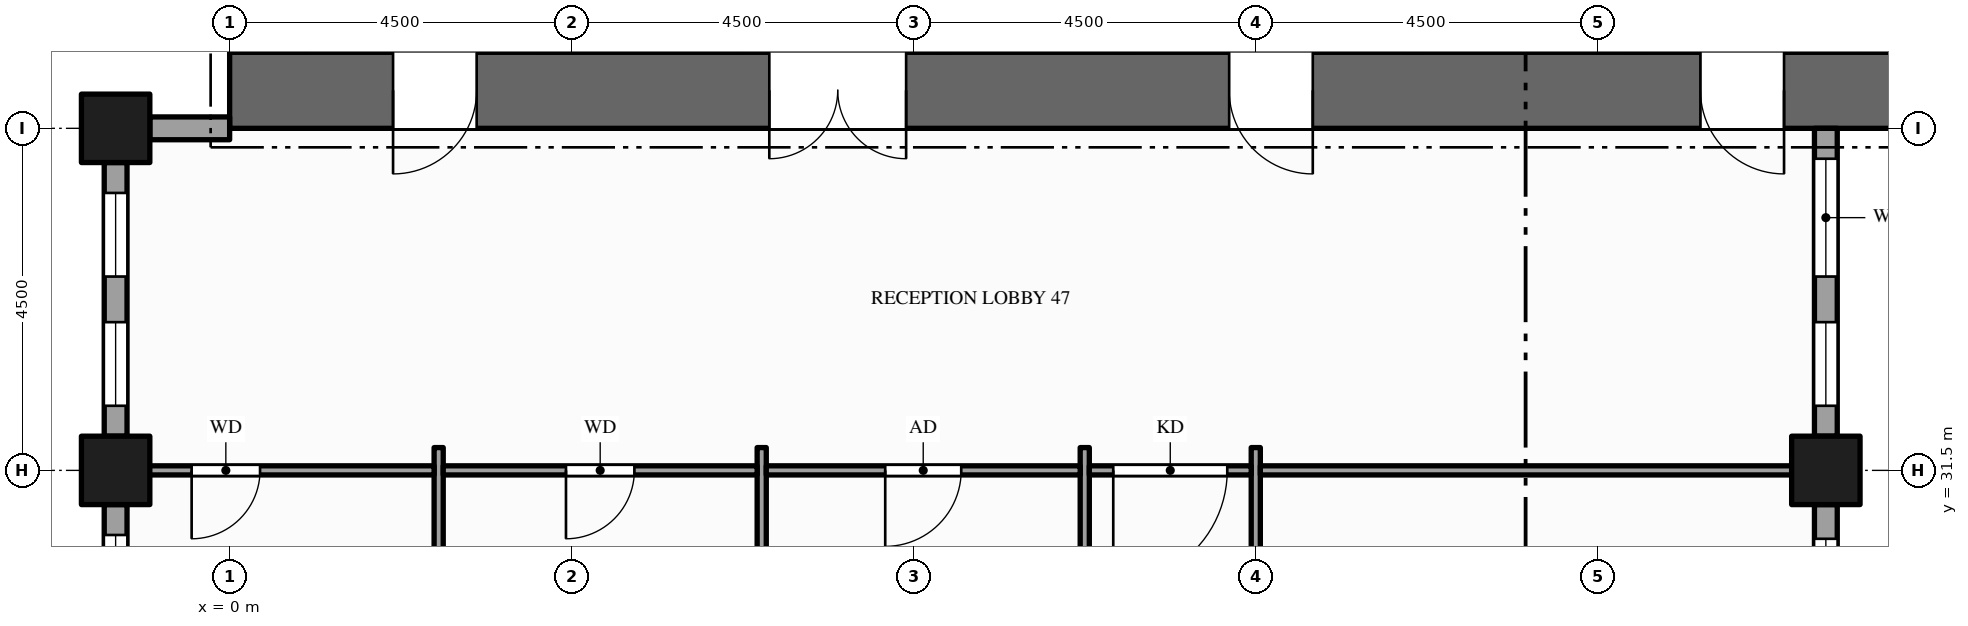
"""IFC4 building model, lengths in metres.
Left out: names, types, materials, properties, quantities, classifications, styles, units other than length and angle.
Written with IfcOpenShell. Run it as: python <this file> out.ifc"""

import sys

from ifc_helpers import new_model, si_unit, direction, frame, frame_2d, origin, origin_2d, place, context, subcontext, project, spatial, rectangle, hollow_rectangle, extrude, element, fill, save


model = new_model("IFC4")
c1 = context("Model", 3, precision=1e-05, world=origin(), true_north=direction((0.0, 1.0)))
c2 = subcontext(c1, "Body", "Model", "MODEL_VIEW")
j1 = project(units=[si_unit("LENGTHUNIT", "METRE"), si_unit("PLANEANGLEUNIT", "RADIAN")], contexts=[c1])
p1 = place(None, origin())
s1 = spatial("IfcSite", under=j1, at=p1, CompositionType="ELEMENT")
p2 = place(p1, origin())
s2 = spatial("IfcBuilding", under=s1, at=p2, CompositionType="ELEMENT")
p3 = place(p2, frame((0.0, 0.0, 183.0)))
s3 = spatial("IfcBuildingStorey", under=s2, at=p3, CompositionType="ELEMENT", Elevation=183.0)
p4 = place(p3, frame((0.0, 36.5, -0.15), z_axis=(0.0, 0.0, 1.0), x_axis=(1.0, 0.0, 0.0)))
e1 = element("IfcWall", 1, at=p4, inside=s3, PredefinedType="SHEAR", context=c2, shape_type="SweptSolid", body=[
    extrude(rectangle(XDim=22.5, YDim=1.0, at=frame_2d((11.25, 0.0))), origin(), (0.0, 0.0, 1.0), 4.0),
])
p5 = place(p4, frame((7.1, 0.0, 0.15)))
e2 = element("IfcOpeningElement", 2, at=p5, cuts=e1, PredefinedType="OPENING", context=c2, shape_type="SweptSolid", body=[
    extrude(rectangle(XDim=1.8, YDim=2.1, at=frame_2d((0.9, 1.05))), frame((0.0, 0.51, 0.0), z_axis=(0.0, -1.0, 0.0), x_axis=(1.0, 0.0, 0.0)), (0.0, 0.0, 1.0), 1.02),
])
p6 = place(p4, frame((13.15, 0.0, 0.15)))
e3 = element("IfcOpeningElement", 3, at=p6, cuts=e1, PredefinedType="OPENING", context=c2, shape_type="SweptSolid", body=[
    extrude(rectangle(XDim=1.1, YDim=2.1, at=frame_2d((0.55, 1.05))), frame((0.0, 0.51, 0.0), z_axis=(0.0, -1.0, 0.0), x_axis=(1.0, 0.0, 0.0)), (0.0, 0.0, 1.0), 1.02),
])
p7 = place(p4, frame((2.15, 0.0, 0.15)))
e4 = element("IfcOpeningElement", 4, at=p7, cuts=e1, PredefinedType="OPENING", context=c2, shape_type="SweptSolid", body=[
    extrude(rectangle(XDim=1.1, YDim=2.1, at=frame_2d((0.55, 1.05))), frame((0.0, 0.51, 0.0), z_axis=(0.0, -1.0, 0.0), x_axis=(1.0, 0.0, 0.0)), (0.0, 0.0, 1.0), 1.02),
])
p8 = place(p4, frame((19.35, 0.0, 0.15)))
e5 = element("IfcOpeningElement", 5, at=p8, cuts=e1, PredefinedType="OPENING", context=c2, shape_type="SweptSolid", body=[
    extrude(rectangle(XDim=1.1, YDim=2.1, at=frame_2d((0.55, 1.05))), frame((0.0, 0.51, 0.0), z_axis=(0.0, -1.0, 0.0), x_axis=(1.0, 0.0, 0.0)), (0.0, 0.0, 1.0), 1.02),
])
for number, where, z_axis, x_axis in (
    (6, (-1.5, 31.5, -0.15), (0.0, 0.0, 1.0), (1.0, 0.0, 0.0)),
    (7, (-1.5, 36.0, -0.15), (0.0, 0.0, 1.0), (1.0, 0.0, 0.0)),
    (8, (21.0, 31.5, -0.15), (0.0, 0.0, 1.0), (1.0, 0.0, 0.0)),
):
    element("IfcColumn", number, at=place(p3, frame(where, z_axis=z_axis, x_axis=x_axis)), inside=s3, PredefinedType="COLUMN", context=c2, shape_type="SweptSolid", body=[
        extrude(hollow_rectangle(XDim=0.9, YDim=0.9, WallThickness=0.045, at=origin_2d()), origin(), (0.0, 0.0, 1.0), 3.9),
    ])
p9 = place(p3, frame((21.0, 28.95, 0.0), z_axis=(0.0, 0.0, 1.0), x_axis=(0.0, 1.0, 0.0)))
e9 = element("IfcWall", 9, at=p9, inside=s3, PredefinedType="STANDARD", context=c2, shape_type="SweptSolid", body=[
    extrude(rectangle(XDim=2.1, YDim=0.3, at=frame_2d((1.05, 0.0))), origin(), (0.0, 0.0, 1.0), 3.049),
])
p10 = place(p9, frame((0.45, 0.0, 0.9)))
e10 = element("IfcOpeningElement", 10, at=p10, cuts=e9, PredefinedType="OPENING", context=c2, shape_type="SweptSolid", body=[
    extrude(rectangle(XDim=1.2, YDim=2.0, at=frame_2d((0.6, 1.0))), frame((0.0, 0.16, 0.0), z_axis=(0.0, -1.0, 0.0), x_axis=(1.0, 0.0, 0.0)), (0.0, 0.0, 1.0), 0.32),
])
p11 = place(p3, frame((21.0, 31.95, 0.0), z_axis=(0.0, 0.0, 1.0), x_axis=(0.0, 1.0, 0.0)))
e11 = element("IfcWall", 11, at=p11, inside=s3, PredefinedType="STANDARD", context=c2, shape_type="SweptSolid", body=[
    extrude(rectangle(XDim=4.05, YDim=0.3, at=frame_2d((2.025, 0.0))), origin(), (0.0, 0.0, 1.0), 3.049),
])
p12 = place(p11, frame((0.4, 0.0, 0.9)))
e12 = element("IfcOpeningElement", 12, at=p12, cuts=e11, PredefinedType="OPENING", context=c2, shape_type="SweptSolid", body=[
    extrude(rectangle(XDim=1.1, YDim=2.0, at=frame_2d((0.55, 1.0))), frame((0.0, 0.16, 0.0), z_axis=(0.0, -1.0, 0.0), x_axis=(1.0, 0.0, 0.0)), (0.0, 0.0, 1.0), 0.32),
])
p13 = place(p11, frame((2.1, 0.0, 0.9)))
e13 = element("IfcOpeningElement", 13, at=p13, cuts=e11, PredefinedType="OPENING", context=c2, shape_type="SweptSolid", body=[
    extrude(rectangle(XDim=1.55, YDim=2.0, at=frame_2d((0.775, 1.0))), frame((0.0, 0.16, 0.0), z_axis=(0.0, -1.0, 0.0), x_axis=(1.0, 0.0, 0.0)), (0.0, 0.0, 1.0), 0.32),
])
p14 = place(p3, frame((0.0, 36.0, 0.0), z_axis=(0.0, 0.0, 1.0), x_axis=(-1.0, 0.0, 0.0)))
e14 = element("IfcWall", 14, at=p14, inside=s3, PredefinedType="STANDARD", context=c2, shape_type="SweptSolid", body=[
    extrude(rectangle(XDim=1.05, YDim=0.3, at=frame_2d((0.525, 0.0))), origin(), (0.0, 0.0, 1.0), 3.049),
])
p15 = place(p3, frame((-1.5, 35.55, 0.0), z_axis=(0.0, 0.0, 1.0), x_axis=(0.0, -1.0, 0.0)))
e15 = element("IfcWall", 15, at=p15, inside=s3, PredefinedType="STANDARD", context=c2, shape_type="SweptSolid", body=[
    extrude(rectangle(XDim=3.6, YDim=0.3, at=frame_2d((1.8, 0.0))), origin(), (0.0, 0.0, 1.0), 3.049),
])
p16 = place(p15, frame((0.4, 0.0, 0.9)))
e16 = element("IfcOpeningElement", 16, at=p16, cuts=e15, PredefinedType="OPENING", context=c2, shape_type="SweptSolid", body=[
    extrude(rectangle(XDim=1.1, YDim=2.0, at=frame_2d((0.55, 1.0))), frame((0.0, 0.16, 0.0), z_axis=(0.0, -1.0, 0.0), x_axis=(1.0, 0.0, 0.0)), (0.0, 0.0, 1.0), 0.32),
])
p17 = place(p15, frame((2.1, 0.0, 0.9)))
e17 = element("IfcOpeningElement", 17, at=p17, cuts=e15, PredefinedType="OPENING", context=c2, shape_type="SweptSolid", body=[
    extrude(rectangle(XDim=1.1, YDim=2.0, at=frame_2d((0.55, 1.0))), frame((0.0, 0.16, 0.0), z_axis=(0.0, -1.0, 0.0), x_axis=(1.0, 0.0, 0.0)), (0.0, 0.0, 1.0), 0.32),
])
p18 = place(p3, frame((-1.5, 31.05, 0.0), z_axis=(0.0, 0.0, 1.0), x_axis=(0.0, -1.0, 0.0)))
e18 = element("IfcWall", 18, at=p18, inside=s3, PredefinedType="STANDARD", context=c2, shape_type="SweptSolid", body=[
    extrude(rectangle(XDim=3.6, YDim=0.3, at=frame_2d((1.8, 0.0))), origin(), (0.0, 0.0, 1.0), 3.049),
])
p19 = place(p18, frame((0.4, 0.0, 0.9)))
e19 = element("IfcOpeningElement", 19, at=p19, cuts=e18, PredefinedType="OPENING", context=c2, shape_type="SweptSolid", body=[
    extrude(rectangle(XDim=1.1, YDim=2.0, at=frame_2d((0.55, 1.0))), frame((0.0, 0.16, 0.0), z_axis=(0.0, -1.0, 0.0), x_axis=(1.0, 0.0, 0.0)), (0.0, 0.0, 1.0), 0.32),
])
p20 = place(p18, frame((2.1, 0.0, 0.9)))
e20 = element("IfcOpeningElement", 20, at=p20, cuts=e18, PredefinedType="OPENING", context=c2, shape_type="SweptSolid", body=[
    extrude(rectangle(XDim=1.1, YDim=2.0, at=frame_2d((0.55, 1.0))), frame((0.0, 0.16, 0.0), z_axis=(0.0, -1.0, 0.0), x_axis=(1.0, 0.0, 0.0)), (0.0, 0.0, 1.0), 0.32),
])
for number, where, z_axis, x_axis in (
    (21, (2.75, 26.7, 0.0), (0.0, 0.0, 1.0), (0.0, 1.0, 0.0)),
    (22, (7.0, 26.7, 0.0), (0.0, 0.0, 1.0), (0.0, 1.0, 0.0)),
):
    element("IfcWall", number, at=place(p3, frame(where, z_axis=z_axis, x_axis=x_axis)), inside=s3, PredefinedType="PARTITIONING", context=c2, shape_type="SweptSolid", body=[
        extrude(rectangle(XDim=5.1, YDim=0.12, at=frame_2d((2.55, 0.0))), origin(), (0.0, 0.0, 1.0), 3.75),
    ])
p21 = place(p3, frame((11.25, 10.95, 0.0), z_axis=(0.0, 0.0, 1.0), x_axis=(0.0, 1.0, 0.0)))
e23 = element("IfcWall", 23, at=p21, inside=s3, PredefinedType="PARTITIONING", context=c2, shape_type="SweptSolid", body=[
    extrude(rectangle(XDim=20.85, YDim=0.12, at=frame_2d((10.425, 0.0))), origin(), (0.0, 0.0, 1.0), 2.5),
])
p22 = place(p21, frame((2.05, 0.0, 0.0)))
e24 = element("IfcOpeningElement", 24, at=p22, cuts=e23, PredefinedType="OPENING", context=c2, shape_type="SweptSolid", body=[
    extrude(rectangle(XDim=1.0, YDim=2.1, at=frame_2d((0.5, 1.05))), frame((0.0, 0.07, 0.0), z_axis=(0.0, -1.0, 0.0), x_axis=(1.0, 0.0, 0.0)), (0.0, 0.0, 1.0), 0.14),
])
p23 = place(p21, frame((6.55, 0.0, 0.0)))
e25 = element("IfcOpeningElement", 25, at=p23, cuts=e23, PredefinedType="OPENING", context=c2, shape_type="SweptSolid", body=[
    extrude(rectangle(XDim=1.0, YDim=2.1, at=frame_2d((0.5, 1.05))), frame((0.0, 0.07, 0.0), z_axis=(0.0, -1.0, 0.0), x_axis=(1.0, 0.0, 0.0)), (0.0, 0.0, 1.0), 0.14),
])
p24 = place(p21, frame((12.205, 0.0, 0.0)))
e26 = element("IfcOpeningElement", 26, at=p24, cuts=e23, PredefinedType="OPENING", context=c2, shape_type="SweptSolid", body=[
    extrude(rectangle(XDim=1.0, YDim=2.1, at=frame_2d((0.5, 1.05))), frame((0.0, 0.07, 0.0), z_axis=(0.0, -1.0, 0.0), x_axis=(1.0, 0.0, 0.0)), (0.0, 0.0, 1.0), 0.14),
])
p25 = place(p3, frame((13.5, 10.95, 0.0), z_axis=(0.0, 0.0, 1.0), x_axis=(0.0, 1.0, 0.0)))
e27 = element("IfcWall", 27, at=p25, inside=s3, PredefinedType="PARTITIONING", context=c2, shape_type="SweptSolid", body=[
    extrude(rectangle(XDim=20.85, YDim=0.12, at=frame_2d((10.425, 0.0))), origin(), (0.0, 0.0, 1.0), 2.5),
])
p26 = place(p25, frame((4.2, 0.0, 0.0)))
e28 = element("IfcOpeningElement", 28, at=p26, cuts=e27, PredefinedType="OPENING", context=c2, shape_type="SweptSolid", body=[
    extrude(rectangle(XDim=1.2, YDim=2.1, at=frame_2d((0.6, 1.05))), frame((0.0, 0.07, 0.0), z_axis=(0.0, -1.0, 0.0), x_axis=(1.0, 0.0, 0.0)), (0.0, 0.0, 1.0), 0.14),
])
p27 = place(p3, frame((-1.35, 31.5, 0.0), z_axis=(0.0, 0.0, 1.0), x_axis=(1.0, 0.0, 0.0)))
e29 = element("IfcWall", 29, at=p27, inside=s3, PredefinedType="PARTITIONING", context=c2, shape_type="SweptSolid", body=[
    extrude(rectangle(XDim=4.04, YDim=0.12, at=frame_2d((2.02, 0.0))), origin(), (0.0, 0.0, 1.0), 2.35),
])
p28 = place(p27, frame((0.85, 0.0, 0.0)))
e30 = element("IfcOpeningElement", 30, at=p28, cuts=e29, PredefinedType="OPENING", context=c2, shape_type="SweptSolid", body=[
    extrude(rectangle(XDim=0.9, YDim=2.1, at=frame_2d((0.45, 1.05))), frame((0.0, 0.07, 0.0), z_axis=(0.0, -1.0, 0.0), x_axis=(1.0, 0.0, 0.0)), (0.0, 0.0, 1.0), 0.14),
])
p29 = place(p3, frame((2.81, 31.5, 0.0), z_axis=(0.0, 0.0, 1.0), x_axis=(1.0, 0.0, 0.0)))
e31 = element("IfcWall", 31, at=p29, inside=s3, PredefinedType="PARTITIONING", context=c2, shape_type="SweptSolid", body=[
    extrude(rectangle(XDim=4.13, YDim=0.12, at=frame_2d((2.065, 0.0))), origin(), (0.0, 0.0, 1.0), 2.77),
])
p30 = place(p29, frame((1.615, 0.0, 0.0)))
e32 = element("IfcOpeningElement", 32, at=p30, cuts=e31, PredefinedType="OPENING", context=c2, shape_type="SweptSolid", body=[
    extrude(rectangle(XDim=0.9, YDim=2.1, at=frame_2d((0.45, 1.05))), frame((0.0, 0.07, 0.0), z_axis=(0.0, -1.0, 0.0), x_axis=(1.0, 0.0, 0.0)), (0.0, 0.0, 1.0), 0.14),
])
p31 = place(p3, frame((7.06, 31.5, 0.0), z_axis=(0.0, 0.0, 1.0), x_axis=(1.0, 0.0, 0.0)))
e33 = element("IfcWall", 33, at=p31, inside=s3, PredefinedType="PARTITIONING", context=c2, shape_type="SweptSolid", body=[
    extrude(rectangle(XDim=4.13, YDim=0.12, at=frame_2d((2.065, 0.0))), origin(), (0.0, 0.0, 1.0), 2.77),
])
p32 = place(p31, frame((1.565, 0.0, 0.0)))
e34 = element("IfcOpeningElement", 34, at=p32, cuts=e33, PredefinedType="OPENING", context=c2, shape_type="SweptSolid", body=[
    extrude(rectangle(XDim=1.0, YDim=2.1, at=frame_2d((0.5, 1.05))), frame((0.0, 0.07, 0.0), z_axis=(0.0, -1.0, 0.0), x_axis=(1.0, 0.0, 0.0)), (0.0, 0.0, 1.0), 0.14),
])
p33 = place(p3, frame((11.31, 31.5, 0.0), z_axis=(0.0, 0.0, 1.0), x_axis=(1.0, 0.0, 0.0)))
e35 = element("IfcWall", 35, at=p33, inside=s3, PredefinedType="PARTITIONING", context=c2, shape_type="SweptSolid", body=[
    extrude(rectangle(XDim=2.13, YDim=0.12, at=frame_2d((1.065, 0.0))), origin(), (0.0, 0.0, 1.0), 2.77),
])
p34 = place(p33, frame((0.315, 0.0, 0.0)))
e36 = element("IfcOpeningElement", 36, at=p34, cuts=e35, PredefinedType="OPENING", context=c2, shape_type="SweptSolid", body=[
    extrude(rectangle(XDim=1.5, YDim=2.1, at=frame_2d((0.75, 1.05))), frame((0.0, 0.07, 0.0), z_axis=(0.0, -1.0, 0.0), x_axis=(1.0, 0.0, 0.0)), (0.0, 0.0, 1.0), 0.14),
])
p35 = place(p3, frame((13.56, 31.5, 0.0), z_axis=(0.0, 0.0, 1.0), x_axis=(1.0, 0.0, 0.0)))
e37 = element("IfcWall", 37, at=p35, inside=s3, PredefinedType="PARTITIONING", context=c2, shape_type="SweptSolid", body=[
    extrude(rectangle(XDim=7.29, YDim=0.12, at=frame_2d((3.645, 0.0))), origin(), (0.0, 0.0, 1.0), 2.77),
])
p36 = place(p10, origin())
e38 = element("IfcWindow", 38, at=p36, inside=s3, PartitioningType="SINGLE_PANEL", PredefinedType="WINDOW", context=c2, shape_type="SweptSolid", body=[
    extrude(rectangle(XDim=1.2, YDim=2.0, at=frame_2d((0.6, 1.0))), frame((0.0, 0.03, 0.0), z_axis=(0.0, -1.0, 0.0), x_axis=(1.0, 0.0, 0.0)), (0.0, 0.0, 1.0), 0.06),
])
fill(e10, e38)
p37 = place(p12, origin())
e39 = element("IfcWindow", 39, at=p37, inside=s3, PartitioningType="SINGLE_PANEL", PredefinedType="WINDOW", context=c2, shape_type="SweptSolid", body=[
    extrude(rectangle(XDim=1.1, YDim=2.0, at=frame_2d((0.55, 1.0))), frame((0.0, 0.03, 0.0), z_axis=(0.0, -1.0, 0.0), x_axis=(1.0, 0.0, 0.0)), (0.0, 0.0, 1.0), 0.06),
])
fill(e12, e39)
p38 = place(p13, origin())
e40 = element("IfcWindow", 40, at=p38, inside=s3, PartitioningType="SINGLE_PANEL", PredefinedType="WINDOW", context=c2, shape_type="SweptSolid", body=[
    extrude(rectangle(XDim=1.55, YDim=2.0, at=frame_2d((0.775, 1.0))), frame((0.0, 0.03, 0.0), z_axis=(0.0, -1.0, 0.0), x_axis=(1.0, 0.0, 0.0)), (0.0, 0.0, 1.0), 0.06),
])
fill(e13, e40)
p39 = place(p16, origin())
e41 = element("IfcWindow", 41, at=p39, inside=s3, PartitioningType="SINGLE_PANEL", PredefinedType="WINDOW", context=c2, shape_type="SweptSolid", body=[
    extrude(rectangle(XDim=1.1, YDim=2.0, at=frame_2d((0.55, 1.0))), frame((0.0, 0.03, 0.0), z_axis=(0.0, -1.0, 0.0), x_axis=(1.0, 0.0, 0.0)), (0.0, 0.0, 1.0), 0.06),
])
fill(e16, e41)
p40 = place(p17, origin())
e42 = element("IfcWindow", 42, at=p40, inside=s3, PartitioningType="SINGLE_PANEL", PredefinedType="WINDOW", context=c2, shape_type="SweptSolid", body=[
    extrude(rectangle(XDim=1.1, YDim=2.0, at=frame_2d((0.55, 1.0))), frame((0.0, 0.03, 0.0), z_axis=(0.0, -1.0, 0.0), x_axis=(1.0, 0.0, 0.0)), (0.0, 0.0, 1.0), 0.06),
])
fill(e17, e42)
p41 = place(p19, origin())
e43 = element("IfcWindow", 43, at=p41, inside=s3, PartitioningType="SINGLE_PANEL", PredefinedType="WINDOW", context=c2, shape_type="SweptSolid", body=[
    extrude(rectangle(XDim=1.1, YDim=2.0, at=frame_2d((0.55, 1.0))), frame((0.0, 0.03, 0.0), z_axis=(0.0, -1.0, 0.0), x_axis=(1.0, 0.0, 0.0)), (0.0, 0.0, 1.0), 0.06),
])
fill(e19, e43)
p42 = place(p5, origin())
e44 = element("IfcDoor", 44, at=p42, inside=s3, OperationType="DOUBLE_DOOR_SINGLE_SWING", PredefinedType="DOOR", context=c2, shape_type="SweptSolid", body=[
    extrude(rectangle(XDim=1.8, YDim=2.1, at=frame_2d((0.9, 1.05))), frame((0.0, 0.025, 0.0), z_axis=(0.0, -1.0, 0.0), x_axis=(1.0, 0.0, 0.0)), (0.0, 0.0, 1.0), 0.05),
])
fill(e2, e44)
p43 = place(p6, origin())
e45 = element("IfcDoor", 45, at=p43, inside=s3, OperationType="SINGLE_SWING_RIGHT", PredefinedType="DOOR", context=c2, shape_type="SweptSolid", body=[
    extrude(rectangle(XDim=1.1, YDim=2.1, at=frame_2d((0.55, 1.05))), frame((0.0, 0.025, 0.0), z_axis=(0.0, -1.0, 0.0), x_axis=(1.0, 0.0, 0.0)), (0.0, 0.0, 1.0), 0.05),
])
fill(e3, e45)
p44 = place(p7, origin())
e46 = element("IfcDoor", 46, at=p44, inside=s3, OperationType="SINGLE_SWING_LEFT", PredefinedType="DOOR", context=c2, shape_type="SweptSolid", body=[
    extrude(rectangle(XDim=1.1, YDim=2.1, at=frame_2d((0.55, 1.05))), frame((0.0, 0.025, 0.0), z_axis=(0.0, -1.0, 0.0), x_axis=(1.0, 0.0, 0.0)), (0.0, 0.0, 1.0), 0.05),
])
fill(e4, e46)
p45 = place(p8, origin())
e47 = element("IfcDoor", 47, at=p45, inside=s3, OperationType="SINGLE_SWING_RIGHT", PredefinedType="DOOR", context=c2, shape_type="SweptSolid", body=[
    extrude(rectangle(XDim=1.1, YDim=2.1, at=frame_2d((0.55, 1.05))), frame((0.0, 0.025, 0.0), z_axis=(0.0, -1.0, 0.0), x_axis=(1.0, 0.0, 0.0)), (0.0, 0.0, 1.0), 0.05),
])
fill(e5, e47)
p46 = place(p34, origin())
e48 = element("IfcDoor", 48, at=p46, inside=s3, OperationType="SINGLE_SWING_LEFT", PredefinedType="DOOR", context=c2, shape_type="SweptSolid", body=[
    extrude(rectangle(XDim=1.5, YDim=2.1, at=frame_2d((0.75, 1.05))), frame((0.0, 0.025, 0.0), z_axis=(0.0, -1.0, 0.0), x_axis=(1.0, 0.0, 0.0)), (0.0, 0.0, 1.0), 0.05),
])
fill(e36, e48)
p47 = place(p28, origin())
e49 = element("IfcDoor", 49, at=p47, inside=s3, OperationType="SINGLE_SWING_LEFT", PredefinedType="DOOR", context=c2, shape_type="SweptSolid", body=[
    extrude(rectangle(XDim=0.9, YDim=2.1, at=frame_2d((0.45, 1.05))), frame((0.0, 0.025, 0.0), z_axis=(0.0, -1.0, 0.0), x_axis=(1.0, 0.0, 0.0)), (0.0, 0.0, 1.0), 0.05),
])
fill(e30, e49)
p48 = place(p30, origin())
e50 = element("IfcDoor", 50, at=p48, inside=s3, OperationType="SINGLE_SWING_LEFT", PredefinedType="DOOR", context=c2, shape_type="SweptSolid", body=[
    extrude(rectangle(XDim=0.9, YDim=2.1, at=frame_2d((0.45, 1.05))), frame((0.0, 0.025, 0.0), z_axis=(0.0, -1.0, 0.0), x_axis=(1.0, 0.0, 0.0)), (0.0, 0.0, 1.0), 0.05),
])
fill(e32, e50)
p49 = place(p32, origin())
e51 = element("IfcDoor", 51, at=p49, inside=s3, OperationType="SINGLE_SWING_LEFT", PredefinedType="DOOR", context=c2, shape_type="SweptSolid", body=[
    extrude(rectangle(XDim=1.0, YDim=2.1, at=frame_2d((0.5, 1.05))), frame((0.0, 0.025, 0.0), z_axis=(0.0, -1.0, 0.0), x_axis=(1.0, 0.0, 0.0)), (0.0, 0.0, 1.0), 0.05),
])
fill(e34, e51)
save(model, sys.argv[1])
